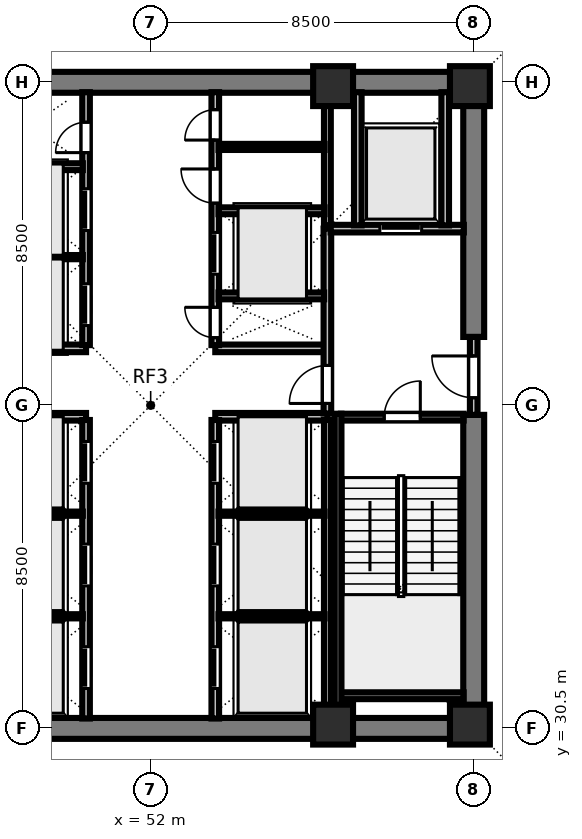
"""IFC4 building model, lengths in metres.
Left out: names, types, materials, properties, quantities, classifications, styles, units other than length and angle.
Written with IfcOpenShell. Run it as: python <this file> out.ifc"""

import sys

from ifc_helpers import new_model, si_unit, direction, frame, frame_2d, origin, origin_2d, place, context, subcontext, project, spatial, rectangle, extrude, element, fill, save


model = new_model("IFC4")
c1 = context("Model", 3, precision=1e-05, world=origin(), true_north=direction((0.0, 1.0)))
c2 = subcontext(c1, "Body", "Model", "MODEL_VIEW")
j1 = project(units=[si_unit("LENGTHUNIT", "METRE"), si_unit("PLANEANGLEUNIT", "RADIAN")], contexts=[c1])
p1 = place(None, origin())
s1 = spatial("IfcSite", under=j1, at=p1, CompositionType="ELEMENT")
p2 = place(p1, origin())
s2 = spatial("IfcBuilding", under=s1, at=p2, CompositionType="ELEMENT")
p3 = place(p2, frame((0.0, 0.0, 101.5)))
s3 = spatial("IfcBuildingStorey", under=s2, at=p3, CompositionType="ELEMENT", Elevation=101.5)
for number, where, z_axis, x_axis in (
    (1, (56.8, 30.6, 0.0), (0.0, 0.0, 1.0), (1.0, 0.0, 0.0)),
    (2, (60.4, 30.6, 0.0), (0.0, 0.0, 1.0), (1.0, 0.0, 0.0)),
    (3, (56.8, 47.4, 0.0), (0.0, 0.0, 1.0), (1.0, 0.0, 0.0)),
    (4, (60.4, 47.4, 0.0), (0.0, 0.0, 1.0), (1.0, 0.0, 0.0)),
):
    element("IfcColumn", number, at=place(p3, frame(where, z_axis=z_axis, x_axis=x_axis)), inside=s3, PredefinedType="COLUMN", context=c2, shape_type="SweptSolid", body=[
        extrude(rectangle(XDim=1.05, YDim=1.05, at=origin_2d()), origin(), (0.0, 0.0, 1.0), 4.5),
    ])
for number, where, z_axis, x_axis in (
    (5, (43.225, 30.5, 0.0), (0.0, 0.0, 1.0), (1.0, 0.0, 0.0)),
    (6, (43.225, 47.5, 0.0), (0.0, 0.0, 1.0), (1.0, 0.0, 0.0)),
):
    element("IfcWall", number, at=place(p3, frame(where, z_axis=z_axis, x_axis=x_axis)), inside=s3, PredefinedType="SHEAR", context=c2, shape_type="SweptSolid", body=[
        extrude(rectangle(XDim=17.55, YDim=0.55, at=frame_2d((8.775, 0.0))), origin(), (0.0, 0.0, 1.0), 4.28),
    ])
p4 = place(p3, frame((60.5, 30.765, 0.0), z_axis=(0.0, 0.0, 1.0), x_axis=(0.0, 1.0, 0.0)))
e7 = element("IfcWall", 7, at=p4, inside=s3, PredefinedType="SHEAR", context=c2, shape_type="SweptSolid", body=[
    extrude(rectangle(XDim=7.985, YDim=0.55, at=frame_2d((3.993, 0.0))), origin(), (0.0, 0.0, 1.0), 4.28),
])
p5 = place(p3, frame((60.5, 40.8, 0.0), z_axis=(0.0, 0.0, 1.0), x_axis=(0.0, 1.0, 0.0)))
e8 = element("IfcWall", 8, at=p5, inside=s3, PredefinedType="SHEAR", context=c2, shape_type="SweptSolid", body=[
    extrude(rectangle(XDim=6.435, YDim=0.55, at=frame_2d((3.218, 0.0))), origin(), (0.0, 0.0, 1.0), 4.28),
])
for number, where, z_axis, x_axis in (
    (9, (47.35, 38.7, 0.0), (0.0, 0.0, 1.0), (1.0, 0.0, 0.0)),
    (10, (47.35, 40.5, 0.0), (0.0, 0.0, 1.0), (1.0, 0.0, 0.0)),
    (11, (53.7, 38.7, 0.0), (0.0, 0.0, 1.0), (1.0, 0.0, 0.0)),
    (12, (53.7, 40.5, 0.0), (0.0, 0.0, 1.0), (1.0, 0.0, 0.0)),
):
    element("IfcWall", number, at=place(p3, frame(where, z_axis=z_axis, x_axis=x_axis)), inside=s3, PredefinedType="SOLIDWALL", context=c2, shape_type="SweptSolid", body=[
        extrude(rectangle(XDim=2.95, YDim=0.2, at=frame_2d((1.475, 0.0))), origin(), (0.0, 0.0, 1.0), 4.28),
    ])
p6 = place(p3, frame((50.3, 30.76, 0.0), z_axis=(0.0, 0.0, 1.0), x_axis=(0.0, 1.0, 0.0)))
e13 = element("IfcWall", 13, at=p6, inside=s3, PredefinedType="SOLIDWALL", context=c2, shape_type="SweptSolid", body=[
    extrude(rectangle(XDim=7.855, YDim=0.2, at=frame_2d((3.927, 0.0))), origin(), (0.0, 0.0, 1.0), 4.28),
])
p7 = place(p6, frame((0.79, 0.0, 0.0)))
e14 = element("IfcOpeningElement", 14, at=p7, cuts=e13, PredefinedType="OPENING", context=c2, shape_type="SweptSolid", body=[
    extrude(rectangle(XDim=1.1, YDim=2.2, at=frame_2d((0.55, 1.1))), frame((0.0, 0.11, 0.0), z_axis=(0.0, -1.0, 0.0), x_axis=(1.0, 0.0, 0.0)), (0.0, 0.0, 1.0), 0.22),
])
p8 = place(p6, frame((3.49, 0.0, 0.0)))
e15 = element("IfcOpeningElement", 15, at=p8, cuts=e13, PredefinedType="OPENING", context=c2, shape_type="SweptSolid", body=[
    extrude(rectangle(XDim=1.1, YDim=2.2, at=frame_2d((0.55, 1.1))), frame((0.0, 0.11, 0.0), z_axis=(0.0, -1.0, 0.0), x_axis=(1.0, 0.0, 0.0)), (0.0, 0.0, 1.0), 0.22),
])
p9 = place(p6, frame((6.19, 0.0, 0.0)))
e16 = element("IfcOpeningElement", 16, at=p9, cuts=e13, PredefinedType="OPENING", context=c2, shape_type="SweptSolid", body=[
    extrude(rectangle(XDim=1.1, YDim=2.2, at=frame_2d((0.55, 1.1))), frame((0.0, 0.11, 0.0), z_axis=(0.0, -1.0, 0.0), x_axis=(1.0, 0.0, 0.0)), (0.0, 0.0, 1.0), 0.22),
])
p10 = place(p3, frame((53.7, 30.76, 0.0), z_axis=(0.0, 0.0, 1.0), x_axis=(0.0, 1.0, 0.0)))
e17 = element("IfcWall", 17, at=p10, inside=s3, PredefinedType="SOLIDWALL", context=c2, shape_type="SweptSolid", body=[
    extrude(rectangle(XDim=7.855, YDim=0.2, at=frame_2d((3.927, 0.0))), origin(), (0.0, 0.0, 1.0), 4.28),
])
p11 = place(p10, frame((0.79, 0.0, 0.0)))
e18 = element("IfcOpeningElement", 18, at=p11, cuts=e17, PredefinedType="OPENING", context=c2, shape_type="SweptSolid", body=[
    extrude(rectangle(XDim=1.1, YDim=2.2, at=frame_2d((0.55, 1.1))), frame((0.0, 0.11, 0.0), z_axis=(0.0, -1.0, 0.0), x_axis=(1.0, 0.0, 0.0)), (0.0, 0.0, 1.0), 0.22),
])
p12 = place(p10, frame((3.49, 0.0, 0.0)))
e19 = element("IfcOpeningElement", 19, at=p12, cuts=e17, PredefinedType="OPENING", context=c2, shape_type="SweptSolid", body=[
    extrude(rectangle(XDim=1.1, YDim=2.2, at=frame_2d((0.55, 1.1))), frame((0.0, 0.11, 0.0), z_axis=(0.0, -1.0, 0.0), x_axis=(1.0, 0.0, 0.0)), (0.0, 0.0, 1.0), 0.22),
])
p13 = place(p10, frame((6.19, 0.0, 0.0)))
e20 = element("IfcOpeningElement", 20, at=p13, cuts=e17, PredefinedType="OPENING", context=c2, shape_type="SweptSolid", body=[
    extrude(rectangle(XDim=1.1, YDim=2.2, at=frame_2d((0.55, 1.1))), frame((0.0, 0.11, 0.0), z_axis=(0.0, -1.0, 0.0), x_axis=(1.0, 0.0, 0.0)), (0.0, 0.0, 1.0), 0.22),
])
p14 = place(p3, frame((50.3, 40.585, 0.0), z_axis=(0.0, 0.0, 1.0), x_axis=(0.0, 1.0, 0.0)))
e21 = element("IfcWall", 21, at=p14, inside=s3, PredefinedType="SOLIDWALL", context=c2, shape_type="SweptSolid", body=[
    extrude(rectangle(XDim=6.655, YDim=0.2, at=frame_2d((3.328, 0.0))), origin(), (0.0, 0.0, 1.0), 4.28),
])
p15 = place(p14, frame((0.515, 0.0, 0.0)))
e22 = element("IfcOpeningElement", 22, at=p15, cuts=e21, PredefinedType="OPENING", context=c2, shape_type="SweptSolid", body=[
    extrude(rectangle(XDim=1.1, YDim=2.2, at=frame_2d((0.55, 1.1))), frame((0.0, 0.11, 0.0), z_axis=(0.0, -1.0, 0.0), x_axis=(1.0, 0.0, 0.0)), (0.0, 0.0, 1.0), 0.22),
])
p16 = place(p14, frame((3.015, 0.0, 0.0)))
e23 = element("IfcOpeningElement", 23, at=p16, cuts=e21, PredefinedType="OPENING", context=c2, shape_type="SweptSolid", body=[
    extrude(rectangle(XDim=1.1, YDim=2.2, at=frame_2d((0.55, 1.1))), frame((0.0, 0.11, 0.0), z_axis=(0.0, -1.0, 0.0), x_axis=(1.0, 0.0, 0.0)), (0.0, 0.0, 1.0), 0.22),
])
p17 = place(p14, frame((5.065, 0.0, 0.0)))
e24 = element("IfcOpeningElement", 24, at=p17, cuts=e21, PredefinedType="OPENING", context=c2, shape_type="SweptSolid", body=[
    extrude(rectangle(XDim=0.8, YDim=2.08, at=frame_2d((0.4, 1.04))), frame((0.0, 0.11, 0.0), z_axis=(0.0, -1.0, 0.0), x_axis=(1.0, 0.0, 0.0)), (0.0, 0.0, 1.0), 0.22),
])
p18 = place(p3, frame((53.7, 40.585, 0.0), z_axis=(0.0, 0.0, 1.0), x_axis=(0.0, 1.0, 0.0)))
e25 = element("IfcWall", 25, at=p18, inside=s3, PredefinedType="SOLIDWALL", context=c2, shape_type="SweptSolid", body=[
    extrude(rectangle(XDim=6.655, YDim=0.2, at=frame_2d((3.328, 0.0))), origin(), (0.0, 0.0, 1.0), 4.28),
])
p19 = place(p18, frame((0.195, 0.0, 0.0)))
e26 = element("IfcOpeningElement", 26, at=p19, cuts=e25, PredefinedType="OPENING", context=c2, shape_type="SweptSolid", body=[
    extrude(rectangle(XDim=0.8, YDim=2.08, at=frame_2d((0.4, 1.04))), frame((0.0, 0.11, 0.0), z_axis=(0.0, -1.0, 0.0), x_axis=(1.0, 0.0, 0.0)), (0.0, 0.0, 1.0), 0.22),
])
p20 = place(p18, frame((1.865, 0.0, 0.0)))
e27 = element("IfcOpeningElement", 27, at=p20, cuts=e25, PredefinedType="OPENING", context=c2, shape_type="SweptSolid", body=[
    extrude(rectangle(XDim=1.1, YDim=2.2, at=frame_2d((0.55, 1.1))), frame((0.0, 0.11, 0.0), z_axis=(0.0, -1.0, 0.0), x_axis=(1.0, 0.0, 0.0)), (0.0, 0.0, 1.0), 0.22),
])
p21 = place(p18, frame((3.735, 0.0, 0.0)))
e28 = element("IfcOpeningElement", 28, at=p21, cuts=e25, PredefinedType="OPENING", context=c2, shape_type="SweptSolid", body=[
    extrude(rectangle(XDim=0.9, YDim=2.12, at=frame_2d((0.45, 1.06))), frame((0.0, 0.11, 0.0), z_axis=(0.0, -1.0, 0.0), x_axis=(1.0, 0.0, 0.0)), (0.0, 0.0, 1.0), 0.22),
])
p22 = place(p18, frame((5.395, 0.0, 0.0)))
e29 = element("IfcOpeningElement", 29, at=p22, cuts=e25, PredefinedType="OPENING", context=c2, shape_type="SweptSolid", body=[
    extrude(rectangle(XDim=0.8, YDim=2.1, at=frame_2d((0.4, 1.05))), frame((0.0, 0.11, 0.0), z_axis=(0.0, -1.0, 0.0), x_axis=(1.0, 0.0, 0.0)), (0.0, 0.0, 1.0), 0.22),
])
p23 = place(p3, frame((60.5, 38.75, 0.0), z_axis=(0.0, 0.0, 1.0), x_axis=(0.0, 1.0, 0.0)))
e30 = element("IfcWall", 30, at=p23, inside=s3, PredefinedType="SOLIDWALL", context=c2, shape_type="SweptSolid", body=[
    extrude(rectangle(XDim=2.05, YDim=0.2, at=frame_2d((1.025, 0.0))), origin(), (0.0, 0.0, 1.0), 4.28),
])
p24 = place(p23, frame((0.45, 0.0, 0.0)))
e31 = element("IfcOpeningElement", 31, at=p24, cuts=e30, PredefinedType="OPENING", context=c2, shape_type="SweptSolid", body=[
    extrude(rectangle(XDim=1.1, YDim=2.15, at=frame_2d((0.55, 1.075))), frame((0.0, 0.11, 0.0), z_axis=(0.0, -1.0, 0.0), x_axis=(1.0, 0.0, 0.0)), (0.0, 0.0, 1.0), 0.22),
])
p25 = place(p3, frame((56.65, 38.785, 0.0), z_axis=(0.0, 0.0, 1.0), x_axis=(0.0, 1.0, 0.0)))
e32 = element("IfcWall", 32, at=p25, inside=s3, PredefinedType="SOLIDWALL", context=c2, shape_type="SweptSolid", body=[
    extrude(rectangle(XDim=4.865, YDim=0.2, at=frame_2d((2.433, 0.0))), origin(), (0.0, 0.0, 1.0), 4.28),
])
p26 = place(p25, frame((0.265, 0.0, 0.0)))
e33 = element("IfcOpeningElement", 33, at=p26, cuts=e32, PredefinedType="OPENING", context=c2, shape_type="SweptSolid", body=[
    extrude(rectangle(XDim=1.0, YDim=2.15, at=frame_2d((0.5, 1.075))), frame((0.0, 0.11, 0.0), z_axis=(0.0, -1.0, 0.0), x_axis=(1.0, 0.0, 0.0)), (0.0, 0.0, 1.0), 0.22),
])
p27 = place(p3, frame((56.735, 43.65, 0.0), z_axis=(0.0, 0.0, 1.0), x_axis=(1.0, 0.0, 0.0)))
e34 = element("IfcWall", 34, at=p27, inside=s3, PredefinedType="SOLIDWALL", context=c2, shape_type="SweptSolid", body=[
    extrude(rectangle(XDim=3.505, YDim=0.2, at=frame_2d((1.752, 0.0))), origin(), (0.0, 0.0, 1.0), 4.28),
])
p28 = place(p27, frame((1.295, 0.0, 0.0)))
e35 = element("IfcOpeningElement", 35, at=p28, cuts=e34, PredefinedType="OPENING", context=c2, shape_type="SweptSolid", body=[
    extrude(rectangle(XDim=1.1, YDim=2.2, at=frame_2d((0.55, 1.1))), frame((0.0, 0.11, 0.0), z_axis=(0.0, -1.0, 0.0), x_axis=(1.0, 0.0, 0.0)), (0.0, 0.0, 1.0), 0.22),
])
for number, where, z_axis, x_axis in (
    (36, (57.45, 43.735, 0.0), (0.0, 0.0, 1.0), (0.0, 1.0, 0.0)),
    (37, (59.75, 43.735, 0.0), (0.0, 0.0, 1.0), (0.0, 1.0, 0.0)),
):
    element("IfcWall", number, at=place(p3, frame(where, z_axis=z_axis, x_axis=x_axis)), inside=s3, PredefinedType="SOLIDWALL", context=c2, shape_type="SweptSolid", body=[
        extrude(rectangle(XDim=3.505, YDim=0.2, at=frame_2d((1.752, 0.0))), origin(), (0.0, 0.0, 1.0), 4.28),
    ])
for number, where, z_axis, x_axis in (
    (38, (47.425, 33.45, 0.0), (0.0, 0.0, 1.0), (1.0, 0.0, 0.0)),
    (39, (47.425, 36.15, 0.0), (0.0, 0.0, 1.0), (1.0, 0.0, 0.0)),
):
    element("IfcWall", number, at=place(p3, frame(where, z_axis=z_axis, x_axis=x_axis)), inside=s3, PredefinedType="PARTITIONING", context=c2, shape_type="SweptSolid", body=[
        extrude(rectangle(XDim=2.79, YDim=0.11, at=frame_2d((1.395, 0.0))), origin(), (0.0, 0.0, 1.0), 4.28),
    ])
p29 = place(p3, frame((56.65, 30.76, 0.0), z_axis=(0.0, 0.0, 1.0), x_axis=(0.0, 1.0, 0.0)))
e40 = element("IfcWall", 40, at=p29, inside=s3, PredefinedType="SOLIDWALL", context=c2, shape_type="SweptSolid", body=[
    extrude(rectangle(XDim=7.855, YDim=0.18, at=frame_2d((3.927, 0.0))), origin(), (0.0, 0.0, 1.0), 4.28),
])
for number, where, z_axis, x_axis in (
    (41, (53.785, 33.45, 0.0), (0.0, 0.0, 1.0), (1.0, 0.0, 0.0)),
    (42, (53.785, 36.15, 0.0), (0.0, 0.0, 1.0), (1.0, 0.0, 0.0)),
):
    element("IfcWall", number, at=place(p3, frame(where, z_axis=z_axis, x_axis=x_axis)), inside=s3, PredefinedType="PARTITIONING", context=c2, shape_type="SweptSolid", body=[
        extrude(rectangle(XDim=2.79, YDim=0.11, at=frame_2d((1.395, 0.0))), origin(), (0.0, 0.0, 1.0), 4.28),
    ])
p30 = place(p3, frame((47.435, 42.9, 0.0), z_axis=(0.0, 0.0, 1.0), x_axis=(1.0, 0.0, 0.0)))
e43 = element("IfcWall", 43, at=p30, inside=s3, PredefinedType="PARTITIONING", context=c2, shape_type="SweptSolid", body=[
    extrude(rectangle(XDim=2.78, YDim=0.11, at=frame_2d((1.39, 0.0))), origin(), (0.0, 0.0, 1.0), 4.28),
])
p31 = place(p3, frame((47.425, 45.28, 0.0), z_axis=(0.0, 0.0, 1.0), x_axis=(1.0, 0.0, 0.0)))
e44 = element("IfcWall", 44, at=p31, inside=s3, PredefinedType="SOLIDWALL", context=c2, shape_type="SweptSolid", body=[
    extrude(rectangle(XDim=2.79, YDim=0.18, at=frame_2d((1.395, 0.0))), origin(), (0.0, 0.0, 1.0), 4.28),
])
p32 = place(p3, frame((56.65, 43.735, 0.0), z_axis=(0.0, 0.0, 1.0), x_axis=(0.0, 1.0, 0.0)))
e45 = element("IfcWall", 45, at=p32, inside=s3, PredefinedType="SOLIDWALL", context=c2, shape_type="SweptSolid", body=[
    extrude(rectangle(XDim=3.505, YDim=0.18, at=frame_2d((1.752, 0.0))), origin(), (0.0, 0.0, 1.0), 4.28),
])
p33 = place(p3, frame((53.785, 41.88, 0.0), z_axis=(0.0, 0.0, 1.0), x_axis=(1.0, 0.0, 0.0)))
e46 = element("IfcWall", 46, at=p33, inside=s3, PredefinedType="SOLIDWALL", context=c2, shape_type="SweptSolid", body=[
    extrude(rectangle(XDim=2.78, YDim=0.18, at=frame_2d((1.39, 0.0))), origin(), (0.0, 0.0, 1.0), 4.28),
])
p34 = place(p3, frame((53.785, 44.12, 0.0), z_axis=(0.0, 0.0, 1.0), x_axis=(1.0, 0.0, 0.0)))
e47 = element("IfcWall", 47, at=p34, inside=s3, PredefinedType="SOLIDWALL", context=c2, shape_type="SweptSolid", body=[
    extrude(rectangle(XDim=2.79, YDim=0.18, at=frame_2d((1.395, 0.0))), origin(), (0.0, 0.0, 1.0), 4.28),
])
p35 = place(p3, frame((53.785, 45.8, 0.0), z_axis=(0.0, 0.0, 1.0), x_axis=(1.0, 0.0, 0.0)))
e48 = element("IfcWall", 48, at=p35, inside=s3, PredefinedType="PARTITIONING", context=c2, shape_type="SweptSolid", body=[
    extrude(rectangle(XDim=2.79, YDim=0.16, at=frame_2d((1.395, 0.0))), origin(), (0.0, 0.0, 1.0), 4.28),
])
p36 = place(p3, frame((57.005, 38.69, 0.0), z_axis=(0.0, 0.0, 1.0), x_axis=(1.0, 0.0, 0.0)))
e49 = element("IfcWall", 49, at=p36, inside=s3, PredefinedType="SOLIDWALL", context=c2, shape_type="SweptSolid", body=[
    extrude(rectangle(XDim=3.23, YDim=0.18, at=frame_2d((1.615, 0.0))), origin(), (0.0, 0.0, 1.0), 4.28),
])
p37 = place(p36, frame((1.14, 0.0, 0.0)))
e50 = element("IfcOpeningElement", 50, at=p37, cuts=e49, PredefinedType="OPENING", context=c2, shape_type="SweptSolid", body=[
    extrude(rectangle(XDim=0.95, YDim=2.15, at=frame_2d((0.475, 1.075))), frame((0.0, 0.1, 0.0), z_axis=(0.0, -1.0, 0.0), x_axis=(1.0, 0.0, 0.0)), (0.0, 0.0, 1.0), 0.2),
])
p38 = place(p3, frame((57.005, 31.36, 0.0), z_axis=(0.0, 0.0, 1.0), x_axis=(1.0, 0.0, 0.0)))
e51 = element("IfcWall", 51, at=p38, inside=s3, PredefinedType="SOLIDWALL", context=c2, shape_type="SweptSolid", body=[
    extrude(rectangle(XDim=3.23, YDim=0.18, at=frame_2d((1.615, 0.0))), origin(), (0.0, 0.0, 1.0), 4.28),
])
p39 = place(p3, frame((56.93, 38.78, 0.0), z_axis=(0.0, 0.0, 1.0), x_axis=(0.0, -1.0, 0.0)))
e52 = element("IfcWall", 52, at=p39, inside=s3, PredefinedType="SOLIDWALL", context=c2, shape_type="SweptSolid", body=[
    extrude(rectangle(XDim=8.017, YDim=0.18, at=frame_2d((4.009, 0.0))), origin(), (0.0, 0.0, 1.0), 4.28),
])
p40 = place(p24, origin())
e53 = element("IfcDoor", 53, at=p40, inside=s3, OperationType="SINGLE_SWING_RIGHT", PredefinedType="DOOR", context=c2, shape_type="SweptSolid", body=[
    extrude(rectangle(XDim=1.1, YDim=2.15, at=frame_2d((0.55, 1.075))), frame((0.0, 0.025, 0.0), z_axis=(0.0, -1.0, 0.0), x_axis=(1.0, 0.0, 0.0)), (0.0, 0.0, 1.0), 0.05),
])
fill(e31, e53)
p41 = place(p26, origin())
e54 = element("IfcDoor", 54, at=p41, inside=s3, OperationType="SINGLE_SWING_LEFT", PredefinedType="DOOR", context=c2, shape_type="SweptSolid", body=[
    extrude(rectangle(XDim=1.0, YDim=2.15, at=frame_2d((0.5, 1.075))), frame((0.0, 0.025, 0.0), z_axis=(0.0, -1.0, 0.0), x_axis=(1.0, 0.0, 0.0)), (0.0, 0.0, 1.0), 0.05),
])
fill(e33, e54)
p42 = place(p28, origin())
e55 = element("IfcDoor", 55, at=p42, inside=s3, OperationType="SLIDING_TO_LEFT", PredefinedType="DOOR", context=c2, shape_type="SweptSolid", body=[
    extrude(rectangle(XDim=1.1, YDim=2.2, at=frame_2d((0.55, 1.1))), frame((0.0, 0.025, 0.0), z_axis=(0.0, -1.0, 0.0), x_axis=(1.0, 0.0, 0.0)), (0.0, 0.0, 1.0), 0.05),
])
fill(e35, e55)
p43 = place(p7, origin())
e56 = element("IfcDoor", 56, at=p43, inside=s3, OperationType="SLIDING_TO_LEFT", PredefinedType="DOOR", context=c2, shape_type="SweptSolid", body=[
    extrude(rectangle(XDim=1.1, YDim=2.2, at=frame_2d((0.55, 1.1))), frame((0.0, 0.025, 0.0), z_axis=(0.0, -1.0, 0.0), x_axis=(1.0, 0.0, 0.0)), (0.0, 0.0, 1.0), 0.05),
])
fill(e14, e56)
p44 = place(p8, origin())
e57 = element("IfcDoor", 57, at=p44, inside=s3, OperationType="SLIDING_TO_LEFT", PredefinedType="DOOR", context=c2, shape_type="SweptSolid", body=[
    extrude(rectangle(XDim=1.1, YDim=2.2, at=frame_2d((0.55, 1.1))), frame((0.0, 0.025, 0.0), z_axis=(0.0, -1.0, 0.0), x_axis=(1.0, 0.0, 0.0)), (0.0, 0.0, 1.0), 0.05),
])
fill(e15, e57)
p45 = place(p9, origin())
e58 = element("IfcDoor", 58, at=p45, inside=s3, OperationType="SLIDING_TO_LEFT", PredefinedType="DOOR", context=c2, shape_type="SweptSolid", body=[
    extrude(rectangle(XDim=1.1, YDim=2.2, at=frame_2d((0.55, 1.1))), frame((0.0, 0.025, 0.0), z_axis=(0.0, -1.0, 0.0), x_axis=(1.0, 0.0, 0.0)), (0.0, 0.0, 1.0), 0.05),
])
fill(e16, e58)
p46 = place(p11, origin())
e59 = element("IfcDoor", 59, at=p46, inside=s3, OperationType="SLIDING_TO_LEFT", PredefinedType="DOOR", context=c2, shape_type="SweptSolid", body=[
    extrude(rectangle(XDim=1.1, YDim=2.2, at=frame_2d((0.55, 1.1))), frame((0.0, 0.025, 0.0), z_axis=(0.0, -1.0, 0.0), x_axis=(1.0, 0.0, 0.0)), (0.0, 0.0, 1.0), 0.05),
])
fill(e18, e59)
p47 = place(p12, origin())
e60 = element("IfcDoor", 60, at=p47, inside=s3, OperationType="SLIDING_TO_LEFT", PredefinedType="DOOR", context=c2, shape_type="SweptSolid", body=[
    extrude(rectangle(XDim=1.1, YDim=2.2, at=frame_2d((0.55, 1.1))), frame((0.0, 0.025, 0.0), z_axis=(0.0, -1.0, 0.0), x_axis=(1.0, 0.0, 0.0)), (0.0, 0.0, 1.0), 0.05),
])
fill(e19, e60)
p48 = place(p13, origin())
e61 = element("IfcDoor", 61, at=p48, inside=s3, OperationType="SLIDING_TO_LEFT", PredefinedType="DOOR", context=c2, shape_type="SweptSolid", body=[
    extrude(rectangle(XDim=1.1, YDim=2.2, at=frame_2d((0.55, 1.1))), frame((0.0, 0.025, 0.0), z_axis=(0.0, -1.0, 0.0), x_axis=(1.0, 0.0, 0.0)), (0.0, 0.0, 1.0), 0.05),
])
fill(e20, e61)
p49 = place(p15, origin())
e62 = element("IfcDoor", 62, at=p49, inside=s3, OperationType="SLIDING_TO_LEFT", PredefinedType="DOOR", context=c2, shape_type="SweptSolid", body=[
    extrude(rectangle(XDim=1.1, YDim=2.2, at=frame_2d((0.55, 1.1))), frame((0.0, 0.025, 0.0), z_axis=(0.0, -1.0, 0.0), x_axis=(1.0, 0.0, 0.0)), (0.0, 0.0, 1.0), 0.05),
])
fill(e22, e62)
p50 = place(p16, origin())
e63 = element("IfcDoor", 63, at=p50, inside=s3, OperationType="SLIDING_TO_LEFT", PredefinedType="DOOR", context=c2, shape_type="SweptSolid", body=[
    extrude(rectangle(XDim=1.1, YDim=2.2, at=frame_2d((0.55, 1.1))), frame((0.0, 0.025, 0.0), z_axis=(0.0, -1.0, 0.0), x_axis=(1.0, 0.0, 0.0)), (0.0, 0.0, 1.0), 0.05),
])
fill(e23, e63)
p51 = place(p17, origin())
e64 = element("IfcDoor", 64, at=p51, inside=s3, OperationType="SINGLE_SWING_LEFT", PredefinedType="DOOR", context=c2, shape_type="SweptSolid", body=[
    extrude(rectangle(XDim=0.8, YDim=2.08, at=frame_2d((0.4, 1.04))), frame((0.0, 0.025, 0.0), z_axis=(0.0, -1.0, 0.0), x_axis=(1.0, 0.0, 0.0)), (0.0, 0.0, 1.0), 0.05),
])
fill(e24, e64)
p52 = place(p19, origin())
e65 = element("IfcDoor", 65, at=p52, inside=s3, OperationType="SINGLE_SWING_RIGHT", PredefinedType="DOOR", context=c2, shape_type="SweptSolid", body=[
    extrude(rectangle(XDim=0.8, YDim=2.08, at=frame_2d((0.4, 1.04))), frame((0.0, 0.025, 0.0), z_axis=(0.0, -1.0, 0.0), x_axis=(1.0, 0.0, 0.0)), (0.0, 0.0, 1.0), 0.05),
])
fill(e26, e65)
p53 = place(p20, origin())
e66 = element("IfcDoor", 66, at=p53, inside=s3, OperationType="SLIDING_TO_LEFT", PredefinedType="DOOR", context=c2, shape_type="SweptSolid", body=[
    extrude(rectangle(XDim=1.1, YDim=2.2, at=frame_2d((0.55, 1.1))), frame((0.0, 0.025, 0.0), z_axis=(0.0, -1.0, 0.0), x_axis=(1.0, 0.0, 0.0)), (0.0, 0.0, 1.0), 0.05),
])
fill(e27, e66)
p54 = place(p21, origin())
e67 = element("IfcDoor", 67, at=p54, inside=s3, OperationType="SINGLE_SWING_RIGHT", PredefinedType="DOOR", context=c2, shape_type="SweptSolid", body=[
    extrude(rectangle(XDim=0.9, YDim=2.12, at=frame_2d((0.45, 1.06))), frame((0.0, 0.025, 0.0), z_axis=(0.0, -1.0, 0.0), x_axis=(1.0, 0.0, 0.0)), (0.0, 0.0, 1.0), 0.05),
])
fill(e28, e67)
p55 = place(p22, origin())
e68 = element("IfcDoor", 68, at=p55, inside=s3, OperationType="SINGLE_SWING_LEFT", PredefinedType="DOOR", context=c2, shape_type="SweptSolid", body=[
    extrude(rectangle(XDim=0.8, YDim=2.1, at=frame_2d((0.4, 1.05))), frame((0.0, 0.025, 0.0), z_axis=(0.0, -1.0, 0.0), x_axis=(1.0, 0.0, 0.0)), (0.0, 0.0, 1.0), 0.05),
])
fill(e29, e68)
p56 = place(p37, origin())
e69 = element("IfcDoor", 69, at=p56, inside=s3, OperationType="SINGLE_SWING_RIGHT", PredefinedType="DOOR", context=c2, shape_type="SweptSolid", body=[
    extrude(rectangle(XDim=0.95, YDim=2.15, at=frame_2d((0.475, 1.075))), frame((0.0, 0.025, 0.0), z_axis=(0.0, -1.0, 0.0), x_axis=(1.0, 0.0, 0.0)), (0.0, 0.0, 1.0), 0.05),
])
fill(e50, e69)
save(model, sys.argv[1])
